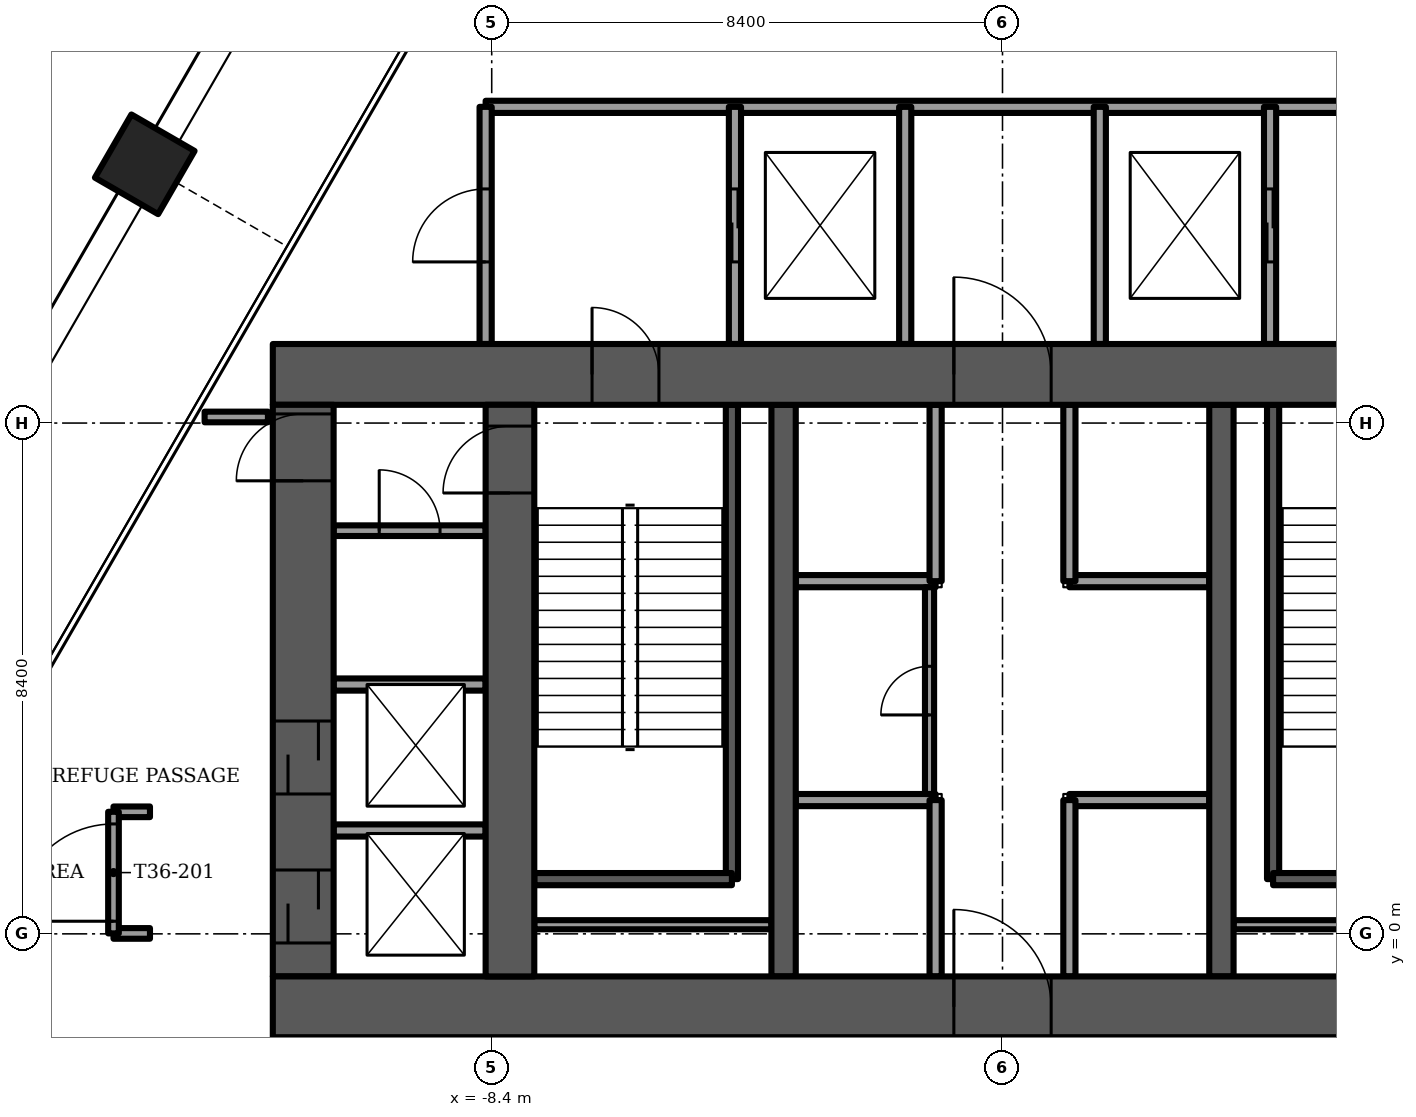
"""IFC4 building model, lengths in metres.
Left out: names, types, materials, properties, quantities, classifications, styles, units other than length and angle.
Written with IfcOpenShell. Run it as: python <this file> out.ifc"""

import sys

from ifc_helpers import new_model, si_unit, direction, frame, frame_2d, origin, origin_2d, place, context, subcontext, project, spatial, rectangle, extrude, element, fill, save


model = new_model("IFC4")
c1 = context("Model", 3, precision=1e-05, world=origin(), true_north=direction((0.0, 1.0)))
c2 = subcontext(c1, "Body", "Model", "MODEL_VIEW")
j1 = project(units=[si_unit("LENGTHUNIT", "METRE"), si_unit("PLANEANGLEUNIT", "RADIAN")], contexts=[c1])
p1 = place(None, origin())
s1 = spatial("IfcSite", under=j1, at=p1, CompositionType="ELEMENT")
p2 = place(p1, origin())
s2 = spatial("IfcBuilding", under=s1, at=p2, CompositionType="ELEMENT")
p3 = place(p2, frame((0.0, 0.0, 146.0)))
s3 = spatial("IfcBuildingStorey", under=s2, at=p3, CompositionType="ELEMENT", Elevation=146.0)
p4 = place(p3, frame((-14.106, 12.655, -1.2), z_axis=(0.0, 0.0, 1.0), x_axis=(0.5, 0.866025403784, 0.0)))
e1 = element("IfcColumn", 1, at=p4, inside=s3, PredefinedType="COLUMN", context=c2, shape_type="SweptSolid", body=[
    extrude(rectangle(XDim=1.2, YDim=1.2, at=origin_2d()), origin(), (0.0, 0.0, 1.0), 5.0),
])
p5 = place(p3, frame((-12.0, -1.2, -0.3), z_axis=(0.0, 0.0, 1.0), x_axis=(1.0, 0.0, 0.0)))
e2 = element("IfcWall", 2, at=p5, inside=s3, PredefinedType="SHEAR", context=c2, shape_type="SweptSolid", body=[
    extrude(rectangle(XDim=24.0, YDim=1.0, at=frame_2d((12.0, 0.0))), origin(), (0.0, 0.0, 1.0), 5.0),
])
p6 = place(p5, frame((11.2, 0.0, 0.0)))
e3 = element("IfcOpeningElement", 3, at=p6, cuts=e2, PredefinedType="OPENING", context=c2, shape_type="SweptSolid", body=[
    extrude(rectangle(XDim=1.6, YDim=2.1, at=frame_2d((0.8, 1.05))), frame((0.0, 0.5, 0.0), z_axis=(0.0, -1.0, 0.0), x_axis=(1.0, 0.0, 0.0)), (0.0, 0.0, 1.0), 1.0),
])
p7 = place(p3, frame((-12.0, 9.2, -0.3), z_axis=(0.0, 0.0, 1.0), x_axis=(1.0, 0.0, 0.0)))
e4 = element("IfcWall", 4, at=p7, inside=s3, PredefinedType="SHEAR", context=c2, shape_type="SweptSolid", body=[
    extrude(rectangle(XDim=24.0, YDim=1.0, at=frame_2d((12.0, 0.0))), origin(), (0.0, 0.0, 1.0), 5.0),
])
p8 = place(p7, frame((11.2, 0.0, 0.0)))
e5 = element("IfcOpeningElement", 5, at=p8, cuts=e4, PredefinedType="OPENING", context=c2, shape_type="SweptSolid", body=[
    extrude(rectangle(XDim=1.6, YDim=2.1, at=frame_2d((0.8, 1.05))), frame((0.0, 0.5, 0.0), z_axis=(0.0, -1.0, 0.0), x_axis=(1.0, 0.0, 0.0)), (0.0, 0.0, 1.0), 1.0),
])
p9 = place(p7, frame((5.25, 0.0, 0.0)))
e6 = element("IfcOpeningElement", 6, at=p9, cuts=e4, PredefinedType="OPENING", context=c2, shape_type="SweptSolid", body=[
    extrude(rectangle(XDim=1.1, YDim=2.1, at=frame_2d((0.55, 1.05))), frame((0.0, 0.5, 0.0), z_axis=(0.0, -1.0, 0.0), x_axis=(1.0, 0.0, 0.0)), (0.0, 0.0, 1.0), 1.0),
])
p10 = place(p7, frame((17.65, 0.0, 0.0)))
e7 = element("IfcOpeningElement", 7, at=p10, cuts=e4, PredefinedType="OPENING", context=c2, shape_type="SweptSolid", body=[
    extrude(rectangle(XDim=1.1, YDim=2.1, at=frame_2d((0.55, 1.05))), frame((0.0, 0.5, 0.0), z_axis=(0.0, -1.0, 0.0), x_axis=(1.0, 0.0, 0.0)), (0.0, 0.0, 1.0), 1.0),
])
p11 = place(p3, frame((-8.1, -0.7, -0.3), z_axis=(0.0, 0.0, 1.0), x_axis=(0.0, 1.0, 0.0)))
e8 = element("IfcWall", 8, at=p11, inside=s3, PredefinedType="SHEAR", context=c2, shape_type="SweptSolid", body=[
    extrude(rectangle(XDim=9.4, YDim=0.8, at=frame_2d((4.7, 0.0))), origin(), (0.0, 0.0, 1.0), 5.0),
])
p12 = place(p11, frame((7.95, 0.0, 0.0)))
e9 = element("IfcOpeningElement", 9, at=p12, cuts=e8, PredefinedType="OPENING", context=c2, shape_type="SweptSolid", body=[
    extrude(rectangle(XDim=1.1, YDim=2.1, at=frame_2d((0.55, 1.05))), frame((0.0, 0.4, 0.0), z_axis=(0.0, -1.0, 0.0), x_axis=(1.0, 0.0, 0.0)), (0.0, 0.0, 1.0), 0.8),
])
for number, where, z_axis, x_axis in (
    (10, (-3.6, -0.7, -0.3), (0.0, 0.0, 1.0), (0.0, 1.0, 0.0)),
    (11, (3.6, -0.7, -0.3), (0.0, 0.0, 1.0), (0.0, 1.0, 0.0)),
):
    element("IfcWall", number, at=place(p3, frame(where, z_axis=z_axis, x_axis=x_axis)), inside=s3, PredefinedType="SHEAR", context=c2, shape_type="SweptSolid", body=[
        extrude(rectangle(XDim=9.4, YDim=0.4, at=frame_2d((4.7, 0.0))), origin(), (0.0, 0.0, 1.0), 5.0),
    ])
p13 = place(p3, frame((-11.5, -0.7, -0.3), z_axis=(0.0, 0.0, 1.0), x_axis=(0.0, 1.0, 0.0)))
e12 = element("IfcWall", 12, at=p13, inside=s3, PredefinedType="SHEAR", context=c2, shape_type="SweptSolid", body=[
    extrude(rectangle(XDim=9.4, YDim=1.0, at=frame_2d((4.7, 0.0))), origin(), (0.0, 0.0, 1.0), 5.0),
])
p14 = place(p13, frame((8.15, 0.0, 0.0)))
e13 = element("IfcOpeningElement", 13, at=p14, cuts=e12, PredefinedType="OPENING", context=c2, shape_type="SweptSolid", body=[
    extrude(rectangle(XDim=1.1, YDim=2.1, at=frame_2d((0.55, 1.05))), frame((0.0, 0.5, 0.0), z_axis=(0.0, -1.0, 0.0), x_axis=(1.0, 0.0, 0.0)), (0.0, 0.0, 1.0), 1.0),
])
p15 = place(p13, frame((0.55, 0.0, 0.0)))
e14 = element("IfcOpeningElement", 14, at=p15, cuts=e12, PredefinedType="OPENING", context=c2, shape_type="SweptSolid", body=[
    extrude(rectangle(XDim=1.2, YDim=2.1, at=frame_2d((0.6, 1.05))), frame((0.0, 0.5, 0.0), z_axis=(0.0, -1.0, 0.0), x_axis=(1.0, 0.0, 0.0)), (0.0, 0.0, 1.0), 1.0),
])
p16 = place(p13, frame((3.0, 0.0, 0.0)))
e15 = element("IfcOpeningElement", 15, at=p16, cuts=e12, PredefinedType="OPENING", context=c2, shape_type="SweptSolid", body=[
    extrude(rectangle(XDim=1.2, YDim=2.1, at=frame_2d((0.6, 1.05))), frame((0.0, 0.5, 0.0), z_axis=(0.0, -1.0, 0.0), x_axis=(1.0, 0.0, 0.0)), (0.0, 0.0, 1.0), 1.0),
])
for number, where, z_axis, x_axis in (
    (16, (-3.4, 2.2, 0.0), (0.0, 0.0, 1.0), (1.0, 0.0, 0.0)),
    (17, (-3.4, 5.8, 0.0), (0.0, 0.0, 1.0), (1.0, 0.0, 0.0)),
    (18, (1.1, 2.2, 0.0), (0.0, 0.0, 1.0), (1.0, 0.0, 0.0)),
    (19, (1.1, 5.8, 0.0), (0.0, 0.0, 1.0), (1.0, 0.0, 0.0)),
):
    element("IfcWall", number, at=place(p3, frame(where, z_axis=z_axis, x_axis=x_axis)), inside=s3, PredefinedType="PARTITIONING", context=c2, shape_type="SweptSolid", body=[
        extrude(rectangle(XDim=2.3, YDim=0.2, at=frame_2d((1.15, 0.0))), origin(), (0.0, 0.0, 1.0), 4.7),
    ])
for number, where, z_axis, x_axis in (
    (20, (-1.1, -0.7, 0.0), (0.0, 0.0, 1.0), (0.0, 1.0, 0.0)),
    (21, (1.1, -0.7, 0.0), (0.0, 0.0, 1.0), (0.0, 1.0, 0.0)),
    (22, (-1.1, 5.8, 0.0), (0.0, 0.0, 1.0), (0.0, 1.0, 0.0)),
    (23, (1.1, 5.8, 0.0), (0.0, 0.0, 1.0), (0.0, 1.0, 0.0)),
):
    element("IfcWall", number, at=place(p3, frame(where, z_axis=z_axis, x_axis=x_axis)), inside=s3, PredefinedType="PARTITIONING", context=c2, shape_type="SweptSolid", body=[
        extrude(rectangle(XDim=2.9, YDim=0.2, at=frame_2d((1.45, 0.0))), origin(), (0.0, 0.0, 1.0), 4.7),
    ])
p17 = place(p3, frame((-4.45, 0.9, -0.3), z_axis=(0.0, 0.0, 1.0), x_axis=(0.0, 1.0, 0.0)))
e24 = element("IfcWall", 24, at=p17, inside=s3, PredefinedType="SOLIDWALL", context=c2, shape_type="SweptSolid", body=[
    extrude(rectangle(XDim=7.8, YDim=0.2, at=frame_2d((3.9, 0.0))), origin(), (0.0, 0.0, 1.0), 5.0),
])
p18 = place(p3, frame((-7.7, 0.9, -0.3), z_axis=(0.0, 0.0, 1.0), x_axis=(1.0, 0.0, 0.0)))
e25 = element("IfcWall", 25, at=p18, inside=s3, PredefinedType="SOLIDWALL", context=c2, shape_type="SweptSolid", body=[
    extrude(rectangle(XDim=3.25, YDim=0.2, at=frame_2d((1.625, 0.0))), origin(), (0.0, 0.0, 1.0), 5.0),
])
p19 = place(p3, frame((-7.7, 0.15, 0.0), z_axis=(0.0, 0.0, 1.0), x_axis=(1.0, 0.0, 0.0)))
e26 = element("IfcWall", 26, at=p19, inside=s3, PredefinedType="PARTITIONING", context=c2, shape_type="SweptSolid", body=[
    extrude(rectangle(XDim=3.9, YDim=0.15, at=frame_2d((1.95, 0.0))), origin(), (0.0, 0.0, 1.0), 4.7),
])
p20 = place(p3, frame((4.45, 0.9, -0.3), z_axis=(0.0, 0.0, 1.0), x_axis=(0.0, 1.0, 0.0)))
e27 = element("IfcWall", 27, at=p20, inside=s3, PredefinedType="SOLIDWALL", context=c2, shape_type="SweptSolid", body=[
    extrude(rectangle(XDim=7.8, YDim=0.2, at=frame_2d((3.9, 0.0))), origin(), (0.0, 0.0, 1.0), 5.0),
])
p21 = place(p3, frame((4.45, 0.9, -0.3), z_axis=(0.0, 0.0, 1.0), x_axis=(1.0, 0.0, 0.0)))
e28 = element("IfcWall", 28, at=p21, inside=s3, PredefinedType="SOLIDWALL", context=c2, shape_type="SweptSolid", body=[
    extrude(rectangle(XDim=3.25, YDim=0.2, at=frame_2d((1.625, 0.0))), origin(), (0.0, 0.0, 1.0), 5.0),
])
p22 = place(p3, frame((3.8, 0.15, 0.0), z_axis=(0.0, 0.0, 1.0), x_axis=(1.0, 0.0, 0.0)))
e29 = element("IfcWall", 29, at=p22, inside=s3, PredefinedType="PARTITIONING", context=c2, shape_type="SweptSolid", body=[
    extrude(rectangle(XDim=3.9, YDim=0.15, at=frame_2d((1.95, 0.0))), origin(), (0.0, 0.0, 1.0), 4.7),
])
p23 = place(p3, frame((-8.5, 13.6, 0.0), z_axis=(0.0, 0.0, 1.0), x_axis=(1.0, 0.0, 0.0)))
e30 = element("IfcWall", 30, at=p23, inside=s3, PredefinedType="PARTITIONING", context=c2, shape_type="SweptSolid", body=[
    extrude(rectangle(XDim=17.0, YDim=0.2, at=frame_2d((8.5, 0.0))), origin(), (0.0, 0.0, 1.0), 4.7),
])
p24 = place(p3, frame((-8.5, 9.7, 0.0), z_axis=(0.0, 0.0, 1.0), x_axis=(0.0, 1.0, 0.0)))
e31 = element("IfcWall", 31, at=p24, inside=s3, PredefinedType="PARTITIONING", context=c2, shape_type="SweptSolid", body=[
    extrude(rectangle(XDim=3.9, YDim=0.2, at=frame_2d((1.95, 0.0))), origin(), (0.0, 0.0, 1.0), 4.7),
])
p25 = place(p24, frame((1.35, 0.0, 0.0)))
e32 = element("IfcOpeningElement", 32, at=p25, cuts=e31, PredefinedType="OPENING", context=c2, shape_type="SweptSolid", body=[
    extrude(rectangle(XDim=1.2, YDim=2.1, at=frame_2d((0.6, 1.05))), frame((0.0, 0.1, 0.0), z_axis=(0.0, -1.0, 0.0), x_axis=(1.0, 0.0, 0.0)), (0.0, 0.0, 1.0), 0.2),
])
p26 = place(p3, frame((-4.4, 9.7, 0.0), z_axis=(0.0, 0.0, 1.0), x_axis=(0.0, 1.0, 0.0)))
e33 = element("IfcWall", 33, at=p26, inside=s3, PredefinedType="PARTITIONING", context=c2, shape_type="SweptSolid", body=[
    extrude(rectangle(XDim=3.9, YDim=0.2, at=frame_2d((1.95, 0.0))), origin(), (0.0, 0.0, 1.0), 4.7),
])
p27 = place(p26, frame((1.35, 0.0, 0.0)))
e34 = element("IfcOpeningElement", 34, at=p27, cuts=e33, PredefinedType="OPENING", context=c2, shape_type="SweptSolid", body=[
    extrude(rectangle(XDim=1.2, YDim=2.1, at=frame_2d((0.6, 1.05))), frame((0.0, 0.1, 0.0), z_axis=(0.0, -1.0, 0.0), x_axis=(1.0, 0.0, 0.0)), (0.0, 0.0, 1.0), 0.2),
])
p28 = place(p3, frame((4.4, 9.7, 0.0), z_axis=(0.0, 0.0, 1.0), x_axis=(0.0, 1.0, 0.0)))
e35 = element("IfcWall", 35, at=p28, inside=s3, PredefinedType="PARTITIONING", context=c2, shape_type="SweptSolid", body=[
    extrude(rectangle(XDim=3.9, YDim=0.2, at=frame_2d((1.95, 0.0))), origin(), (0.0, 0.0, 1.0), 4.7),
])
p29 = place(p28, frame((1.35, 0.0, 0.0)))
e36 = element("IfcOpeningElement", 36, at=p29, cuts=e35, PredefinedType="OPENING", context=c2, shape_type="SweptSolid", body=[
    extrude(rectangle(XDim=1.2, YDim=2.1, at=frame_2d((0.6, 1.05))), frame((0.0, 0.1, 0.0), z_axis=(0.0, -1.0, 0.0), x_axis=(1.0, 0.0, 0.0)), (0.0, 0.0, 1.0), 0.2),
])
for number, where, z_axis, x_axis in (
    (37, (-1.6, 9.7, 0.0), (0.0, 0.0, 1.0), (0.0, 1.0, 0.0)),
    (38, (1.6, 9.7, 0.0), (0.0, 0.0, 1.0), (0.0, 1.0, 0.0)),
):
    element("IfcWall", number, at=place(p3, frame(where, z_axis=z_axis, x_axis=x_axis)), inside=s3, PredefinedType="PARTITIONING", context=c2, shape_type="SweptSolid", body=[
        extrude(rectangle(XDim=3.9, YDim=0.2, at=frame_2d((1.95, 0.0))), origin(), (0.0, 0.0, 1.0), 4.7),
    ])
p30 = place(p3, frame((-1.2, 2.3, 0.0), z_axis=(0.0, 0.0, 1.0), x_axis=(0.0, 1.0, 0.0)))
e39 = element("IfcWall", 39, at=p30, inside=s3, PredefinedType="PARTITIONING", context=c2, shape_type="SweptSolid", body=[
    extrude(rectangle(XDim=3.4, YDim=0.15, at=frame_2d((1.7, 0.0))), origin(), (0.0, 0.0, 1.0), 4.7),
])
p31 = place(p30, frame((1.3, 0.0, 0.0)))
e40 = element("IfcOpeningElement", 40, at=p31, cuts=e39, PredefinedType="OPENING", context=c2, shape_type="SweptSolid", body=[
    extrude(rectangle(XDim=0.8, YDim=2.1, at=frame_2d((0.4, 1.05))), frame((0.0, 0.075, 0.0), z_axis=(0.0, -1.0, 0.0), x_axis=(1.0, 0.0, 0.0)), (0.0, 0.0, 1.0), 0.15),
])
for number, where, z_axis, x_axis in (
    (41, (-11.0, 1.7, 0.0), (0.0, 0.0, 1.0), (1.0, 0.0, 0.0)),
    (42, (-11.0, 4.1, 0.0), (0.0, 0.0, 1.0), (1.0, 0.0, 0.0)),
):
    element("IfcWall", number, at=place(p3, frame(where, z_axis=z_axis, x_axis=x_axis)), inside=s3, PredefinedType="PARTITIONING", context=c2, shape_type="SweptSolid", body=[
        extrude(rectangle(XDim=2.5, YDim=0.2, at=frame_2d((1.25, 0.0))), origin(), (0.0, 0.0, 1.0), 4.7),
    ])
p32 = place(p3, frame((-11.0, 6.63, 0.0), z_axis=(0.0, 0.0, 1.0), x_axis=(1.0, 0.0, 0.0)))
e43 = element("IfcWall", 43, at=p32, inside=s3, PredefinedType="PARTITIONING", context=c2, shape_type="SweptSolid", body=[
    extrude(rectangle(XDim=2.5, YDim=0.175, at=frame_2d((1.25, 0.0))), origin(), (0.0, 0.0, 1.0), 4.7),
])
p33 = place(p32, frame((0.75, 0.0, 0.0)))
e44 = element("IfcOpeningElement", 44, at=p33, cuts=e43, PredefinedType="OPENING", context=c2, shape_type="SweptSolid", body=[
    extrude(rectangle(XDim=1.0, YDim=2.1, at=frame_2d((0.5, 1.05))), frame((0.0, 0.087, 0.0), z_axis=(0.0, -1.0, 0.0), x_axis=(1.0, 0.0, 0.0)), (0.0, 0.0, 1.0), 0.175),
])
for number, where, z_axis, x_axis in (
    (45, (-14.62, 0.007, 0.0), (0.0, 0.0, 1.0), (1.0, 0.0, 0.0)),
    (46, (-14.62, 2.007, 0.0), (0.0, 0.0, 1.0), (1.0, 0.0, 0.0)),
):
    element("IfcWall", number, at=place(p3, frame(where, z_axis=z_axis, x_axis=x_axis)), inside=s3, PredefinedType="PARTITIONING", context=c2, shape_type="SweptSolid", body=[
        extrude(rectangle(XDim=0.6, YDim=0.175, at=frame_2d((0.3, 0.0))), origin(), (0.0, 0.0, 1.0), 4.7),
    ])
p34 = place(p3, frame((-13.122, 8.5, 0.0), z_axis=(0.0, 0.0, 1.0), x_axis=(1.0, 0.0, 0.0)))
e47 = element("IfcWall", 47, at=p34, inside=s3, PredefinedType="PARTITIONING", context=c2, shape_type="SweptSolid", body=[
    extrude(rectangle(XDim=1.042, YDim=0.175, at=frame_2d((0.521, 0.0))), origin(), (0.0, 0.0, 1.0), 4.7),
])
p35 = place(p3, frame((-14.62, 0.007, 0.0), z_axis=(0.0, 0.0, 1.0), x_axis=(0.0, 1.0, 0.0)))
e48 = element("IfcWall", 48, at=p35, inside=s3, PredefinedType="PARTITIONING", context=c2, shape_type="SweptSolid", body=[
    extrude(rectangle(XDim=2.0, YDim=0.175, at=frame_2d((1.0, 0.0))), origin(), (0.0, 0.0, 1.0), 4.7),
])
p36 = place(p35, frame((0.2, 0.0, 0.0)))
e49 = element("IfcOpeningElement", 49, at=p36, cuts=e48, PredefinedType="OPENING", context=c2, shape_type="SweptSolid", body=[
    extrude(rectangle(XDim=1.6, YDim=2.1, at=frame_2d((0.8, 1.05))), frame((0.0, 0.087, 0.0), z_axis=(0.0, -1.0, 0.0), x_axis=(1.0, 0.0, 0.0)), (0.0, 0.0, 1.0), 0.175),
])
p37 = place(p6, origin())
e50 = element("IfcDoor", 50, at=p37, inside=s3, OperationType="DOUBLE_DOOR_SINGLE_SWING", PredefinedType="DOOR", context=c2, shape_type="SweptSolid", body=[
    extrude(rectangle(XDim=1.6, YDim=2.1, at=frame_2d((0.8, 1.05))), frame((0.0, 0.025, 0.0), z_axis=(0.0, -1.0, 0.0), x_axis=(1.0, 0.0, 0.0)), (0.0, 0.0, 1.0), 0.05),
])
fill(e3, e50)
p38 = place(p8, origin())
e51 = element("IfcDoor", 51, at=p38, inside=s3, OperationType="DOUBLE_DOOR_SINGLE_SWING", PredefinedType="DOOR", context=c2, shape_type="SweptSolid", body=[
    extrude(rectangle(XDim=1.6, YDim=2.1, at=frame_2d((0.8, 1.05))), frame((0.0, 0.025, 0.0), z_axis=(0.0, -1.0, 0.0), x_axis=(1.0, 0.0, 0.0)), (0.0, 0.0, 1.0), 0.05),
])
fill(e5, e51)
p39 = place(p9, origin())
e52 = element("IfcDoor", 52, at=p39, inside=s3, OperationType="SINGLE_SWING_LEFT", PredefinedType="DOOR", context=c2, shape_type="SweptSolid", body=[
    extrude(rectangle(XDim=1.1, YDim=2.1, at=frame_2d((0.55, 1.05))), frame((0.0, 0.025, 0.0), z_axis=(0.0, -1.0, 0.0), x_axis=(1.0, 0.0, 0.0)), (0.0, 0.0, 1.0), 0.05),
])
fill(e6, e52)
p40 = place(p12, origin())
e53 = element("IfcDoor", 53, at=p40, inside=s3, OperationType="SINGLE_SWING_RIGHT", PredefinedType="DOOR", context=c2, shape_type="SweptSolid", body=[
    extrude(rectangle(XDim=1.1, YDim=2.1, at=frame_2d((0.55, 1.05))), frame((0.0, 0.025, 0.0), z_axis=(0.0, -1.0, 0.0), x_axis=(1.0, 0.0, 0.0)), (0.0, 0.0, 1.0), 0.05),
])
fill(e9, e53)
p41 = place(p27, origin())
e54 = element("IfcDoor", 54, at=p41, inside=s3, OperationType="SLIDING_TO_LEFT", PredefinedType="DOOR", context=c2, shape_type="SweptSolid", body=[
    extrude(rectangle(XDim=1.2, YDim=2.1, at=frame_2d((0.6, 1.05))), frame((0.0, 0.025, 0.0), z_axis=(0.0, -1.0, 0.0), x_axis=(1.0, 0.0, 0.0)), (0.0, 0.0, 1.0), 0.05),
])
fill(e34, e54)
p42 = place(p25, origin())
e55 = element("IfcDoor", 55, at=p42, inside=s3, OperationType="SINGLE_SWING_LEFT", PredefinedType="DOOR", context=c2, shape_type="SweptSolid", body=[
    extrude(rectangle(XDim=1.2, YDim=2.1, at=frame_2d((0.6, 1.05))), frame((0.0, 0.025, 0.0), z_axis=(0.0, -1.0, 0.0), x_axis=(1.0, 0.0, 0.0)), (0.0, 0.0, 1.0), 0.05),
])
fill(e32, e55)
p43 = place(p29, origin())
e56 = element("IfcDoor", 56, at=p43, inside=s3, OperationType="SLIDING_TO_LEFT", PredefinedType="DOOR", context=c2, shape_type="SweptSolid", body=[
    extrude(rectangle(XDim=1.2, YDim=2.1, at=frame_2d((0.6, 1.05))), frame((0.0, 0.025, 0.0), z_axis=(0.0, -1.0, 0.0), x_axis=(1.0, 0.0, 0.0)), (0.0, 0.0, 1.0), 0.05),
])
fill(e36, e56)
p44 = place(p31, origin())
e57 = element("IfcDoor", 57, at=p44, inside=s3, OperationType="SINGLE_SWING_LEFT", PredefinedType="DOOR", context=c2, shape_type="SweptSolid", body=[
    extrude(rectangle(XDim=0.8, YDim=2.1, at=frame_2d((0.4, 1.05))), frame((0.0, 0.025, 0.0), z_axis=(0.0, -1.0, 0.0), x_axis=(1.0, 0.0, 0.0)), (0.0, 0.0, 1.0), 0.05),
])
fill(e40, e57)
p45 = place(p33, origin())
e58 = element("IfcDoor", 58, at=p45, inside=s3, OperationType="SINGLE_SWING_LEFT", PredefinedType="DOOR", context=c2, shape_type="SweptSolid", body=[
    extrude(rectangle(XDim=1.0, YDim=2.1, at=frame_2d((0.5, 1.05))), frame((0.0, 0.025, 0.0), z_axis=(0.0, -1.0, 0.0), x_axis=(1.0, 0.0, 0.0)), (0.0, 0.0, 1.0), 0.05),
])
fill(e44, e58)
p46 = place(p14, origin())
e59 = element("IfcDoor", 59, at=p46, inside=s3, OperationType="SINGLE_SWING_LEFT", PredefinedType="DOOR", context=c2, shape_type="SweptSolid", body=[
    extrude(rectangle(XDim=1.1, YDim=2.1, at=frame_2d((0.55, 1.05))), frame((0.0, 0.025, 0.0), z_axis=(0.0, -1.0, 0.0), x_axis=(1.0, 0.0, 0.0)), (0.0, 0.0, 1.0), 0.05),
])
fill(e13, e59)
p47 = place(p15, origin())
e60 = element("IfcDoor", 60, at=p47, inside=s3, OperationType="SLIDING_TO_LEFT", PredefinedType="DOOR", context=c2, shape_type="SweptSolid", body=[
    extrude(rectangle(XDim=1.2, YDim=2.1, at=frame_2d((0.6, 1.05))), frame((0.0, 0.025, 0.0), z_axis=(0.0, -1.0, 0.0), x_axis=(1.0, 0.0, 0.0)), (0.0, 0.0, 1.0), 0.05),
])
fill(e14, e60)
p48 = place(p16, origin())
e61 = element("IfcDoor", 61, at=p48, inside=s3, OperationType="SLIDING_TO_LEFT", PredefinedType="DOOR", context=c2, shape_type="SweptSolid", body=[
    extrude(rectangle(XDim=1.2, YDim=2.1, at=frame_2d((0.6, 1.05))), frame((0.0, 0.025, 0.0), z_axis=(0.0, -1.0, 0.0), x_axis=(1.0, 0.0, 0.0)), (0.0, 0.0, 1.0), 0.05),
])
fill(e15, e61)
p49 = place(p36, origin())
e62 = element("IfcDoor", 62, at=p49, inside=s3, OperationType="DOUBLE_DOOR_SINGLE_SWING", PredefinedType="DOOR", context=c2, shape_type="SweptSolid", body=[
    extrude(rectangle(XDim=1.6, YDim=2.1, at=frame_2d((0.8, 1.05))), frame((0.0, 0.025, 0.0), z_axis=(0.0, -1.0, 0.0), x_axis=(1.0, 0.0, 0.0)), (0.0, 0.0, 1.0), 0.05),
])
fill(e49, e62)
save(model, sys.argv[1])
